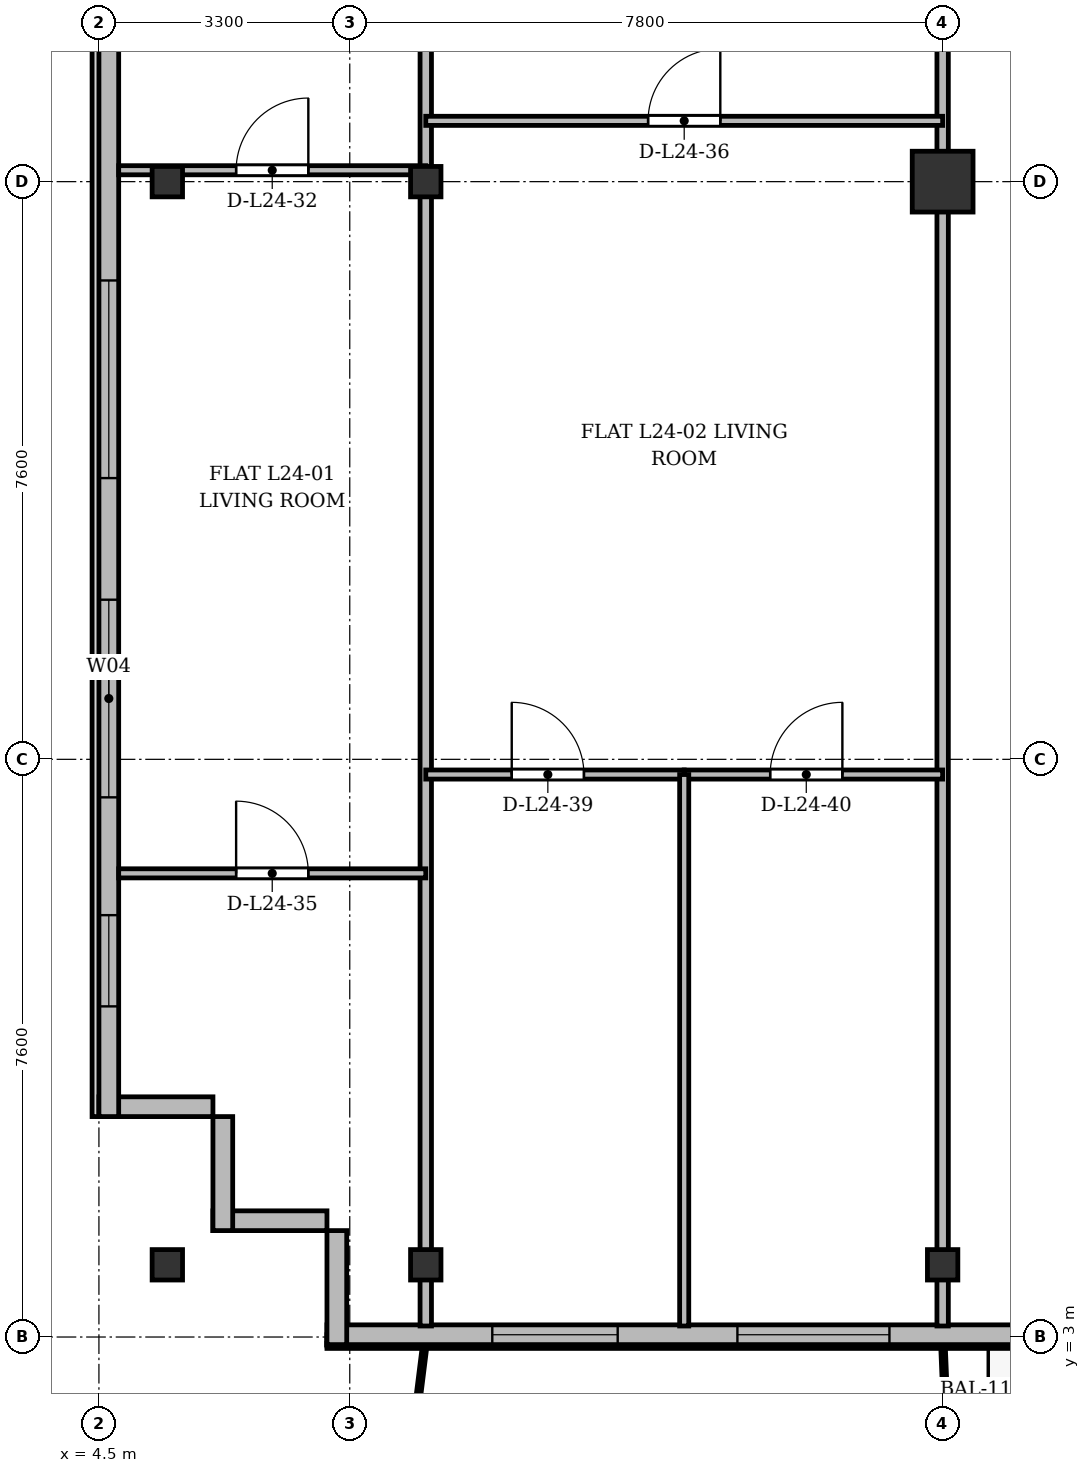
"""IFC4 building model, lengths in metres.
Left out: names, types, materials, properties, quantities, classifications, styles, units other than length and angle.
Written with IfcOpenShell. Run it as: python <this file> out.ifc"""

import sys

from ifc_helpers import new_model, si_unit, direction, frame, frame_2d, origin, origin_2d, place, context, subcontext, project, spatial, rectangle, i_section, extrude, source, transform, mapped, element, fill, save


model = new_model("IFC4")
c1 = context("Model", 3, precision=1e-05, world=origin(), true_north=direction((0.0, 1.0)))
c2 = subcontext(c1, "Body", "Model", "MODEL_VIEW")
j1 = project(units=[si_unit("LENGTHUNIT", "METRE"), si_unit("PLANEANGLEUNIT", "RADIAN")], contexts=[c1])
p1 = place(None, origin())
s1 = spatial("IfcSite", under=j1, at=p1, CompositionType="ELEMENT")
p2 = place(p1, origin())
s2 = spatial("IfcBuilding", under=s1, at=p2, CompositionType="ELEMENT")
p3 = place(p2, frame((0.0, 0.0, 96.1)))
s3 = spatial("IfcBuildingStorey", under=s2, at=p3, CompositionType="ELEMENT", Elevation=96.1)
m1 = source(origin(), c2, "Body", "SweptSolid", [
    extrude(i_section(OverallWidth=0.4, OverallDepth=0.4, WebThickness=0.022, FlangeThickness=0.035, at=origin_2d()), origin(), (0.0, 0.0, 1.0), 3.6),
])
for number, where, z_axis, x_axis in (
    (1, (5.4, 3.95, 0.0), (0.0, 0.0, 1.0), (1.0, 0.0, 0.0)),
    (2, (5.4, 18.2, 0.0), (0.0, 0.0, 1.0), (1.0, 0.0, 0.0)),
    (3, (8.8, 3.95, 0.0), (0.0, 0.0, 1.0), (1.0, 0.0, 0.0)),
    (4, (8.8, 18.2, 0.0), (0.0, 0.0, 1.0), (1.0, 0.0, 0.0)),
    (5, (15.6, 3.95, 0.0), (0.0, 0.0, 1.0), (1.0, 0.0, 0.0)),
):
    element("IfcColumn", number, at=place(p3, frame(where, z_axis=z_axis, x_axis=x_axis)), inside=s3, PredefinedType="COLUMN", context=c2, shape_type="MappedRepresentation", body=[
        mapped(m1, transform((0.0, 0.0, 0.0), x_axis=(1.0, 0.0, 0.0), y_axis=(0.0, 1.0, 0.0), z_axis=(0.0, 0.0, 1.0), scale=1.0)),
    ])
m2 = source(origin(), c2, "Body", "SweptSolid", [
    extrude(rectangle(XDim=0.8, YDim=0.8, at=origin_2d()), origin(), (0.0, 0.0, 1.0), 3.6),
])
p4 = place(p3, frame((15.6, 18.2, 0.0), z_axis=(0.0, 0.0, 1.0), x_axis=(1.0, 0.0, 0.0)))
e6 = element("IfcColumn", 6, at=p4, inside=s3, PredefinedType="COLUMN", context=c2, shape_type="MappedRepresentation", body=[
    mapped(m2, transform((0.0, 0.0, 0.0), x_axis=(1.0, 0.0, 0.0), y_axis=(0.0, 1.0, 0.0), z_axis=(0.0, 0.0, 1.0), scale=1.0)),
])
for number, where, z_axis, x_axis in (
    (7, (7.5, 4.53, 0.0), (0.0, 0.0, 1.0), (-1.0, 0.0, 0.0)),
    (8, (6.13, 4.4, 0.0), (0.0, 0.0, 1.0), (0.0, 1.0, 0.0)),
):
    element("IfcWall", number, at=place(p3, frame(where, z_axis=z_axis, x_axis=x_axis)), inside=s3, PredefinedType="SOLIDWALL", context=c2, shape_type="SweptSolid", body=[
        extrude(rectangle(XDim=1.5, YDim=0.26, at=frame_2d((0.75, 0.0))), origin(), (0.0, 0.0, 1.0), 3.34),
    ])
p5 = place(p3, frame((6.0, 6.03, 0.0), z_axis=(0.0, 0.0, 1.0), x_axis=(-1.0, 0.0, 0.0)))
e9 = element("IfcWall", 9, at=p5, inside=s3, PredefinedType="SOLIDWALL", context=c2, shape_type="SweptSolid", body=[
    extrude(rectangle(XDim=1.5, YDim=0.26, at=frame_2d((0.75, 0.0))), origin(), (0.0, 0.0, 1.0), 2.84),
])
p6 = place(p3, frame((4.63, 5.9, 0.0), z_axis=(0.0, 0.0, 1.0), x_axis=(0.0, 1.0, 0.0)))
e10 = element("IfcWall", 10, at=p6, inside=s3, PredefinedType="SOLIDWALL", context=c2, shape_type="SweptSolid", body=[
    extrude(rectangle(XDim=39.6, YDim=0.26, at=frame_2d((19.8, 0.0))), origin(), (0.0, 0.0, 1.0), 3.34),
])
p7 = place(p6, frame((1.45, 0.0, 0.92)))
e11 = element("IfcOpeningElement", 11, at=p7, cuts=e10, PredefinedType="OPENING", context=c2, shape_type="SweptSolid", body=[
    extrude(rectangle(XDim=1.2, YDim=1.65, at=frame_2d((0.6, 0.825))), frame((0.0, 0.14, 0.0), z_axis=(0.0, -1.0, 0.0), x_axis=(1.0, 0.0, 0.0)), (0.0, 0.0, 1.0), 0.28),
])
p8 = place(p6, frame((4.2, 0.0, 0.92)))
e12 = element("IfcOpeningElement", 12, at=p8, cuts=e10, PredefinedType="OPENING", context=c2, shape_type="SweptSolid", body=[
    extrude(rectangle(XDim=2.6, YDim=1.9, at=frame_2d((1.3, 0.95))), frame((0.0, 0.14, 0.0), z_axis=(0.0, -1.0, 0.0), x_axis=(1.0, 0.0, 0.0)), (0.0, 0.0, 1.0), 0.28),
])
p9 = place(p6, frame((8.4, 0.0, 0.92)))
e13 = element("IfcOpeningElement", 13, at=p9, cuts=e10, PredefinedType="OPENING", context=c2, shape_type="SweptSolid", body=[
    extrude(rectangle(XDim=2.6, YDim=1.9, at=frame_2d((1.3, 0.95))), frame((0.0, 0.14, 0.0), z_axis=(0.0, -1.0, 0.0), x_axis=(1.0, 0.0, 0.0)), (0.0, 0.0, 1.0), 0.28),
])
p10 = place(p6, frame((33.9, 0.0, 0.92)))
e14 = element("IfcOpeningElement", 14, at=p10, cuts=e10, PredefinedType="OPENING", context=c2, shape_type="SweptSolid", body=[
    extrude(rectangle(XDim=1.2, YDim=1.65, at=frame_2d((0.6, 0.825))), frame((0.0, 0.14, 0.0), z_axis=(0.0, -1.0, 0.0), x_axis=(1.0, 0.0, 0.0)), (0.0, 0.0, 1.0), 0.28),
])
p11 = place(p6, frame((37.25, 0.0, 0.92)))
e15 = element("IfcOpeningElement", 15, at=p11, cuts=e10, PredefinedType="OPENING", context=c2, shape_type="SweptSolid", body=[
    extrude(rectangle(XDim=1.2, YDim=1.65, at=frame_2d((0.6, 0.825))), frame((0.0, 0.14, 0.0), z_axis=(0.0, -1.0, 0.0), x_axis=(1.0, 0.0, 0.0)), (0.0, 0.0, 1.0), 0.28),
])
p12 = place(p3, frame((66.9, 3.03, 0.0), z_axis=(0.0, 0.0, 1.0), x_axis=(-1.0, 0.0, 0.0)))
e16 = element("IfcWall", 16, at=p12, inside=s3, PredefinedType="SOLIDWALL", context=c2, shape_type="SweptSolid", body=[
    extrude(rectangle(XDim=59.4, YDim=0.26, at=frame_2d((29.7, 0.0))), origin(), (0.0, 0.0, 1.0), 3.34),
])
p13 = place(p12, frame((2.1, 0.0, 0.9)))
e17 = element("IfcOpeningElement", 17, at=p13, cuts=e16, PredefinedType="OPENING", context=c2, shape_type="SweptSolid", body=[
    extrude(rectangle(XDim=1.8, YDim=1.8, at=frame_2d((0.9, 0.9))), frame((0.0, 0.14, 0.0), z_axis=(0.0, -1.0, 0.0), x_axis=(1.0, 0.0, 0.0)), (0.0, 0.0, 1.0), 0.28),
])
p14 = place(p12, frame((5.3, 0.0, 0.9)))
e18 = element("IfcOpeningElement", 18, at=p14, cuts=e16, PredefinedType="OPENING", context=c2, shape_type="SweptSolid", body=[
    extrude(rectangle(XDim=2.2, YDim=1.8, at=frame_2d((1.1, 0.9))), frame((0.0, 0.14, 0.0), z_axis=(0.0, -1.0, 0.0), x_axis=(1.0, 0.0, 0.0)), (0.0, 0.0, 1.0), 0.28),
])
p15 = place(p12, frame((8.65, 0.0, 0.9)))
e19 = element("IfcOpeningElement", 19, at=p15, cuts=e16, PredefinedType="OPENING", context=c2, shape_type="SweptSolid", body=[
    extrude(rectangle(XDim=1.5, YDim=1.75, at=frame_2d((0.75, 0.875))), frame((0.0, 0.14, 0.0), z_axis=(0.0, -1.0, 0.0), x_axis=(1.0, 0.0, 0.0)), (0.0, 0.0, 1.0), 0.28),
])
p16 = place(p12, frame((11.0, 0.0, 0.9)))
e20 = element("IfcOpeningElement", 20, at=p16, cuts=e16, PredefinedType="OPENING", context=c2, shape_type="SweptSolid", body=[
    extrude(rectangle(XDim=2.0, YDim=1.95, at=frame_2d((1.0, 0.975))), frame((0.0, 0.14, 0.0), z_axis=(0.0, -1.0, 0.0), x_axis=(1.0, 0.0, 0.0)), (0.0, 0.0, 1.0), 0.28),
])
p17 = place(p12, frame((13.775, 0.0, 0.9)))
e21 = element("IfcOpeningElement", 21, at=p17, cuts=e16, PredefinedType="OPENING", context=c2, shape_type="SweptSolid", body=[
    extrude(rectangle(XDim=1.65, YDim=1.85, at=frame_2d((0.825, 0.925))), frame((0.0, 0.14, 0.0), z_axis=(0.0, -1.0, 0.0), x_axis=(1.0, 0.0, 0.0)), (0.0, 0.0, 1.0), 0.28),
])
p18 = place(p12, frame((16.7, 0.0, 0.9)))
e22 = element("IfcOpeningElement", 22, at=p18, cuts=e16, PredefinedType="OPENING", context=c2, shape_type="SweptSolid", body=[
    extrude(rectangle(XDim=1.8, YDim=1.8, at=frame_2d((0.9, 0.9))), frame((0.0, 0.14, 0.0), z_axis=(0.0, -1.0, 0.0), x_axis=(1.0, 0.0, 0.0)), (0.0, 0.0, 1.0), 0.28),
])
p19 = place(p12, frame((20.227, 0.0, 0.0)))
e23 = element("IfcOpeningElement", 23, at=p19, cuts=e16, PredefinedType="OPENING", context=c2, shape_type="SweptSolid", body=[
    extrude(rectangle(XDim=1.2, YDim=2.2, at=frame_2d((0.6, 1.1))), frame((0.0, 0.14, 0.0), z_axis=(0.0, -1.0, 0.0), x_axis=(1.0, 0.0, 0.0)), (0.0, 0.0, 1.0), 0.28),
])
p20 = place(p12, frame((28.95, 0.0, 0.9)))
e24 = element("IfcOpeningElement", 24, at=p20, cuts=e16, PredefinedType="OPENING", context=c2, shape_type="SweptSolid", body=[
    extrude(rectangle(XDim=1.5, YDim=1.75, at=frame_2d((0.75, 0.875))), frame((0.0, 0.14, 0.0), z_axis=(0.0, -1.0, 0.0), x_axis=(1.0, 0.0, 0.0)), (0.0, 0.0, 1.0), 0.28),
])
p21 = place(p12, frame((36.5, 0.0, 0.9)))
e25 = element("IfcOpeningElement", 25, at=p21, cuts=e16, PredefinedType="OPENING", context=c2, shape_type="SweptSolid", body=[
    extrude(rectangle(XDim=2.0, YDim=1.95, at=frame_2d((1.0, 0.975))), frame((0.0, 0.14, 0.0), z_axis=(0.0, -1.0, 0.0), x_axis=(1.0, 0.0, 0.0)), (0.0, 0.0, 1.0), 0.28),
])
p22 = place(p12, frame((39.075, 0.0, 0.9)))
e26 = element("IfcOpeningElement", 26, at=p22, cuts=e16, PredefinedType="OPENING", context=c2, shape_type="SweptSolid", body=[
    extrude(rectangle(XDim=1.65, YDim=1.85, at=frame_2d((0.825, 0.925))), frame((0.0, 0.14, 0.0), z_axis=(0.0, -1.0, 0.0), x_axis=(1.0, 0.0, 0.0)), (0.0, 0.0, 1.0), 0.28),
])
p23 = place(p12, frame((41.4, 0.0, 0.9)))
e27 = element("IfcOpeningElement", 27, at=p23, cuts=e16, PredefinedType="OPENING", context=c2, shape_type="SweptSolid", body=[
    extrude(rectangle(XDim=1.8, YDim=1.8, at=frame_2d((0.9, 0.9))), frame((0.0, 0.14, 0.0), z_axis=(0.0, -1.0, 0.0), x_axis=(1.0, 0.0, 0.0)), (0.0, 0.0, 1.0), 0.28),
])
p24 = place(p12, frame((45.36, 0.0, 0.0)))
e28 = element("IfcOpeningElement", 28, at=p24, cuts=e16, PredefinedType="OPENING", context=c2, shape_type="SweptSolid", body=[
    extrude(rectangle(XDim=1.2, YDim=2.2, at=frame_2d((0.6, 1.1))), frame((0.0, 0.14, 0.0), z_axis=(0.0, -1.0, 0.0), x_axis=(1.0, 0.0, 0.0)), (0.0, 0.0, 1.0), 0.28),
])
p25 = place(p12, frame((48.55, 0.0, 0.9)))
e29 = element("IfcOpeningElement", 29, at=p25, cuts=e16, PredefinedType="OPENING", context=c2, shape_type="SweptSolid", body=[
    extrude(rectangle(XDim=1.5, YDim=1.75, at=frame_2d((0.75, 0.875))), frame((0.0, 0.14, 0.0), z_axis=(0.0, -1.0, 0.0), x_axis=(1.0, 0.0, 0.0)), (0.0, 0.0, 1.0), 0.28),
])
p26 = place(p12, frame((52.0, 0.0, 0.9)))
e30 = element("IfcOpeningElement", 30, at=p26, cuts=e16, PredefinedType="OPENING", context=c2, shape_type="SweptSolid", body=[
    extrude(rectangle(XDim=2.0, YDim=1.95, at=frame_2d((1.0, 0.975))), frame((0.0, 0.14, 0.0), z_axis=(0.0, -1.0, 0.0), x_axis=(1.0, 0.0, 0.0)), (0.0, 0.0, 1.0), 0.28),
])
p27 = place(p12, frame((55.575, 0.0, 0.9)))
e31 = element("IfcOpeningElement", 31, at=p27, cuts=e16, PredefinedType="OPENING", context=c2, shape_type="SweptSolid", body=[
    extrude(rectangle(XDim=1.65, YDim=1.85, at=frame_2d((0.825, 0.925))), frame((0.0, 0.14, 0.0), z_axis=(0.0, -1.0, 0.0), x_axis=(1.0, 0.0, 0.0)), (0.0, 0.0, 1.0), 0.28),
])
p28 = place(p3, frame((7.63, 2.9, 0.0), z_axis=(0.0, 0.0, 1.0), x_axis=(0.0, 1.0, 0.0)))
e32 = element("IfcWall", 32, at=p28, inside=s3, PredefinedType="SOLIDWALL", context=c2, shape_type="SweptSolid", body=[
    extrude(rectangle(XDim=1.5, YDim=0.26, at=frame_2d((0.75, 0.0))), origin(), (0.0, 0.0, 1.0), 2.752),
])
for number, where, z_axis, x_axis in (
    (33, (8.8, 3.145, 0.0), (0.0, 0.0, 1.0), (0.0, 1.0, 0.0)),
    (34, (15.6, 3.145, 0.0), (0.0, 0.0, 1.0), (0.0, 1.0, 0.0)),
):
    element("IfcWall", number, at=place(p3, frame(where, z_axis=z_axis, x_axis=x_axis)), inside=s3, PredefinedType="PARTITIONING", context=c2, shape_type="SweptSolid", body=[
        extrude(rectangle(XDim=24.455, YDim=0.15, at=frame_2d((12.228, 0.0))), origin(), (0.0, 0.0, 1.0), 2.84),
    ])
p29 = place(p3, frame((4.76, 18.35, 0.0), z_axis=(0.0, 0.0, 1.0), x_axis=(1.0, 0.0, 0.0)))
e35 = element("IfcWall", 35, at=p29, inside=s3, PredefinedType="PARTITIONING", context=c2, shape_type="SweptSolid", body=[
    extrude(rectangle(XDim=4.04, YDim=0.12, at=frame_2d((2.02, 0.0))), origin(), (0.0, 0.0, 1.0), 2.752),
])
p30 = place(p29, frame((1.545, 0.0, 0.0)))
e36 = element("IfcOpeningElement", 36, at=p30, cuts=e35, PredefinedType="OPENING", context=c2, shape_type="SweptSolid", body=[
    extrude(rectangle(XDim=0.95, YDim=2.15, at=frame_2d((0.475, 1.075))), frame((0.0, 0.07, 0.0), z_axis=(0.0, -1.0, 0.0), x_axis=(1.0, 0.0, 0.0)), (0.0, 0.0, 1.0), 0.14),
])
p31 = place(p3, frame((4.76, 9.1, 0.0), z_axis=(0.0, 0.0, 1.0), x_axis=(1.0, 0.0, 0.0)))
e37 = element("IfcWall", 37, at=p31, inside=s3, PredefinedType="PARTITIONING", context=c2, shape_type="SweptSolid", body=[
    extrude(rectangle(XDim=4.04, YDim=0.12, at=frame_2d((2.02, 0.0))), origin(), (0.0, 0.0, 1.0), 2.84),
])
p32 = place(p31, frame((1.545, 0.0, 0.0)))
e38 = element("IfcOpeningElement", 38, at=p32, cuts=e37, PredefinedType="OPENING", context=c2, shape_type="SweptSolid", body=[
    extrude(rectangle(XDim=0.95, YDim=2.15, at=frame_2d((0.475, 1.075))), frame((0.0, 0.07, 0.0), z_axis=(0.0, -1.0, 0.0), x_axis=(1.0, 0.0, 0.0)), (0.0, 0.0, 1.0), 0.14),
])
p33 = place(p3, frame((8.8, 19.0, 0.0), z_axis=(0.0, 0.0, 1.0), x_axis=(1.0, 0.0, 0.0)))
e39 = element("IfcWall", 39, at=p33, inside=s3, PredefinedType="PARTITIONING", context=c2, shape_type="SweptSolid", body=[
    extrude(rectangle(XDim=6.8, YDim=0.12, at=frame_2d((3.4, 0.0))), origin(), (0.0, 0.0, 1.0), 2.84),
])
p34 = place(p33, frame((2.925, 0.0, 0.0)))
e40 = element("IfcOpeningElement", 40, at=p34, cuts=e39, PredefinedType="OPENING", context=c2, shape_type="SweptSolid", body=[
    extrude(rectangle(XDim=0.95, YDim=2.15, at=frame_2d((0.475, 1.075))), frame((0.0, 0.07, 0.0), z_axis=(0.0, -1.0, 0.0), x_axis=(1.0, 0.0, 0.0)), (0.0, 0.0, 1.0), 0.14),
])
p35 = place(p3, frame((8.8, 10.4, 0.0), z_axis=(0.0, 0.0, 1.0), x_axis=(1.0, 0.0, 0.0)))
e41 = element("IfcWall", 41, at=p35, inside=s3, PredefinedType="PARTITIONING", context=c2, shape_type="SweptSolid", body=[
    extrude(rectangle(XDim=3.4, YDim=0.12, at=frame_2d((1.7, 0.0))), origin(), (0.0, 0.0, 1.0), 2.84),
])
p36 = place(p35, frame((1.131, 0.0, 0.0)))
e42 = element("IfcOpeningElement", 42, at=p36, cuts=e41, PredefinedType="OPENING", context=c2, shape_type="SweptSolid", body=[
    extrude(rectangle(XDim=0.95, YDim=2.15, at=frame_2d((0.475, 1.075))), frame((0.0, 0.07, 0.0), z_axis=(0.0, -1.0, 0.0), x_axis=(1.0, 0.0, 0.0)), (0.0, 0.0, 1.0), 0.14),
])
p37 = place(p3, frame((12.2, 10.4, 0.0), z_axis=(0.0, 0.0, 1.0), x_axis=(1.0, 0.0, 0.0)))
e43 = element("IfcWall", 43, at=p37, inside=s3, PredefinedType="PARTITIONING", context=c2, shape_type="SweptSolid", body=[
    extrude(rectangle(XDim=3.4, YDim=0.12, at=frame_2d((1.7, 0.0))), origin(), (0.0, 0.0, 1.0), 2.84),
])
p38 = place(p37, frame((1.131, 0.0, 0.0)))
e44 = element("IfcOpeningElement", 44, at=p38, cuts=e43, PredefinedType="OPENING", context=c2, shape_type="SweptSolid", body=[
    extrude(rectangle(XDim=0.95, YDim=2.15, at=frame_2d((0.475, 1.075))), frame((0.0, 0.07, 0.0), z_axis=(0.0, -1.0, 0.0), x_axis=(1.0, 0.0, 0.0)), (0.0, 0.0, 1.0), 0.14),
])
p39 = place(p3, frame((12.2, 3.145, 0.0), z_axis=(0.0, 0.0, 1.0), x_axis=(0.0, 1.0, 0.0)))
e45 = element("IfcWall", 45, at=p39, inside=s3, PredefinedType="PARTITIONING", context=c2, shape_type="SweptSolid", body=[
    extrude(rectangle(XDim=7.255, YDim=0.12, at=frame_2d((3.627, 0.0))), origin(), (0.0, 0.0, 1.0), 2.752),
])
m3 = source(origin(), c2, "Body", "SweptSolid", [
    extrude(rectangle(XDim=1.2, YDim=1.65, at=frame_2d((0.6, 0.825))), frame((0.0, 0.03, 0.0), z_axis=(0.0, -1.0, 0.0), x_axis=(1.0, 0.0, 0.0)), (0.0, 0.0, 1.0), 0.06),
])
p40 = place(p7, origin())
e46 = element("IfcWindow", 46, at=p40, inside=s3, PartitioningType="SINGLE_PANEL", PredefinedType="WINDOW", context=c2, shape_type="MappedRepresentation", body=[
    mapped(m3, transform((0.0, 0.0, 0.0), x_axis=(1.0, 0.0, 0.0), y_axis=(0.0, 1.0, 0.0), z_axis=(0.0, 0.0, 1.0), scale=1.0)),
])
fill(e11, e46)
m4 = source(origin(), c2, "Body", "SweptSolid", [
    extrude(rectangle(XDim=2.6, YDim=1.9, at=frame_2d((1.3, 0.95))), frame((0.0, 0.03, 0.0), z_axis=(0.0, -1.0, 0.0), x_axis=(1.0, 0.0, 0.0)), (0.0, 0.0, 1.0), 0.06),
])
p41 = place(p8, origin())
e47 = element("IfcWindow", 47, at=p41, inside=s3, PartitioningType="SINGLE_PANEL", PredefinedType="WINDOW", context=c2, shape_type="MappedRepresentation", body=[
    mapped(m4, transform((0.0, 0.0, 0.0), x_axis=(1.0, 0.0, 0.0), y_axis=(0.0, 1.0, 0.0), z_axis=(0.0, 0.0, 1.0), scale=1.0)),
])
fill(e12, e47)
p42 = place(p9, origin())
e48 = element("IfcWindow", 48, at=p42, inside=s3, PartitioningType="SINGLE_PANEL", PredefinedType="WINDOW", context=c2, shape_type="MappedRepresentation", body=[
    mapped(m4, transform((0.0, 0.0, 0.0), x_axis=(1.0, 0.0, 0.0), y_axis=(0.0, 1.0, 0.0), z_axis=(0.0, 0.0, 1.0), scale=1.0)),
])
fill(e13, e48)
m5 = source(origin(), c2, "Body", "SweptSolid", [
    extrude(rectangle(XDim=2.0, YDim=1.95, at=frame_2d((1.0, 0.975))), frame((0.0, 0.03, 0.0), z_axis=(0.0, -1.0, 0.0), x_axis=(1.0, 0.0, 0.0)), (0.0, 0.0, 1.0), 0.06),
])
p43 = place(p26, origin())
e49 = element("IfcWindow", 49, at=p43, inside=s3, PartitioningType="SINGLE_PANEL", PredefinedType="WINDOW", context=c2, shape_type="MappedRepresentation", body=[
    mapped(m5, transform((0.0, 0.0, 0.0), x_axis=(1.0, 0.0, 0.0), y_axis=(0.0, 1.0, 0.0), z_axis=(0.0, 0.0, 1.0), scale=1.0)),
])
fill(e30, e49)
m6 = source(origin(), c2, "Body", "SweptSolid", [
    extrude(rectangle(XDim=1.65, YDim=1.85, at=frame_2d((0.825, 0.925))), frame((0.0, 0.03, 0.0), z_axis=(0.0, -1.0, 0.0), x_axis=(1.0, 0.0, 0.0)), (0.0, 0.0, 1.0), 0.06),
])
p44 = place(p27, origin())
e50 = element("IfcWindow", 50, at=p44, inside=s3, PartitioningType="SINGLE_PANEL", PredefinedType="WINDOW", context=c2, shape_type="MappedRepresentation", body=[
    mapped(m6, transform((0.0, 0.0, 0.0), x_axis=(1.0, 0.0, 0.0), y_axis=(0.0, 1.0, 0.0), z_axis=(0.0, 0.0, 1.0), scale=1.0)),
])
fill(e31, e50)
m7 = source(origin(), c2, "Body", "SweptSolid", [
    extrude(rectangle(XDim=0.95, YDim=2.15, at=frame_2d((0.475, 1.075))), frame((0.0, 0.025, 0.0), z_axis=(0.0, -1.0, 0.0), x_axis=(1.0, 0.0, 0.0)), (0.0, 0.0, 1.0), 0.05),
])
p45 = place(p30, origin())
e51 = element("IfcDoor", 51, at=p45, inside=s3, OperationType="SINGLE_SWING_RIGHT", PredefinedType="DOOR", context=c2, shape_type="MappedRepresentation", body=[
    mapped(m7, transform((0.0, 0.0, 0.0), x_axis=(1.0, 0.0, 0.0), y_axis=(0.0, 1.0, 0.0), z_axis=(0.0, 0.0, 1.0), scale=1.0)),
])
fill(e36, e51)
p46 = place(p32, origin())
e52 = element("IfcDoor", 52, at=p46, inside=s3, OperationType="SINGLE_SWING_LEFT", PredefinedType="DOOR", context=c2, shape_type="MappedRepresentation", body=[
    mapped(m7, transform((0.0, 0.0, 0.0), x_axis=(1.0, 0.0, 0.0), y_axis=(0.0, 1.0, 0.0), z_axis=(0.0, 0.0, 1.0), scale=1.0)),
])
fill(e38, e52)
p47 = place(p34, origin())
e53 = element("IfcDoor", 53, at=p47, inside=s3, OperationType="SINGLE_SWING_RIGHT", PredefinedType="DOOR", context=c2, shape_type="MappedRepresentation", body=[
    mapped(m7, transform((0.0, 0.0, 0.0), x_axis=(1.0, 0.0, 0.0), y_axis=(0.0, 1.0, 0.0), z_axis=(0.0, 0.0, 1.0), scale=1.0)),
])
fill(e40, e53)
p48 = place(p36, origin())
e54 = element("IfcDoor", 54, at=p48, inside=s3, OperationType="SINGLE_SWING_LEFT", PredefinedType="DOOR", context=c2, shape_type="MappedRepresentation", body=[
    mapped(m7, transform((0.0, 0.0, 0.0), x_axis=(1.0, 0.0, 0.0), y_axis=(0.0, 1.0, 0.0), z_axis=(0.0, 0.0, 1.0), scale=1.0)),
])
fill(e42, e54)
p49 = place(p38, origin())
e55 = element("IfcDoor", 55, at=p49, inside=s3, OperationType="SINGLE_SWING_RIGHT", PredefinedType="DOOR", context=c2, shape_type="MappedRepresentation", body=[
    mapped(m7, transform((0.0, 0.0, 0.0), x_axis=(1.0, 0.0, 0.0), y_axis=(0.0, 1.0, 0.0), z_axis=(0.0, 0.0, 1.0), scale=1.0)),
])
fill(e44, e55)
save(model, sys.argv[1])
